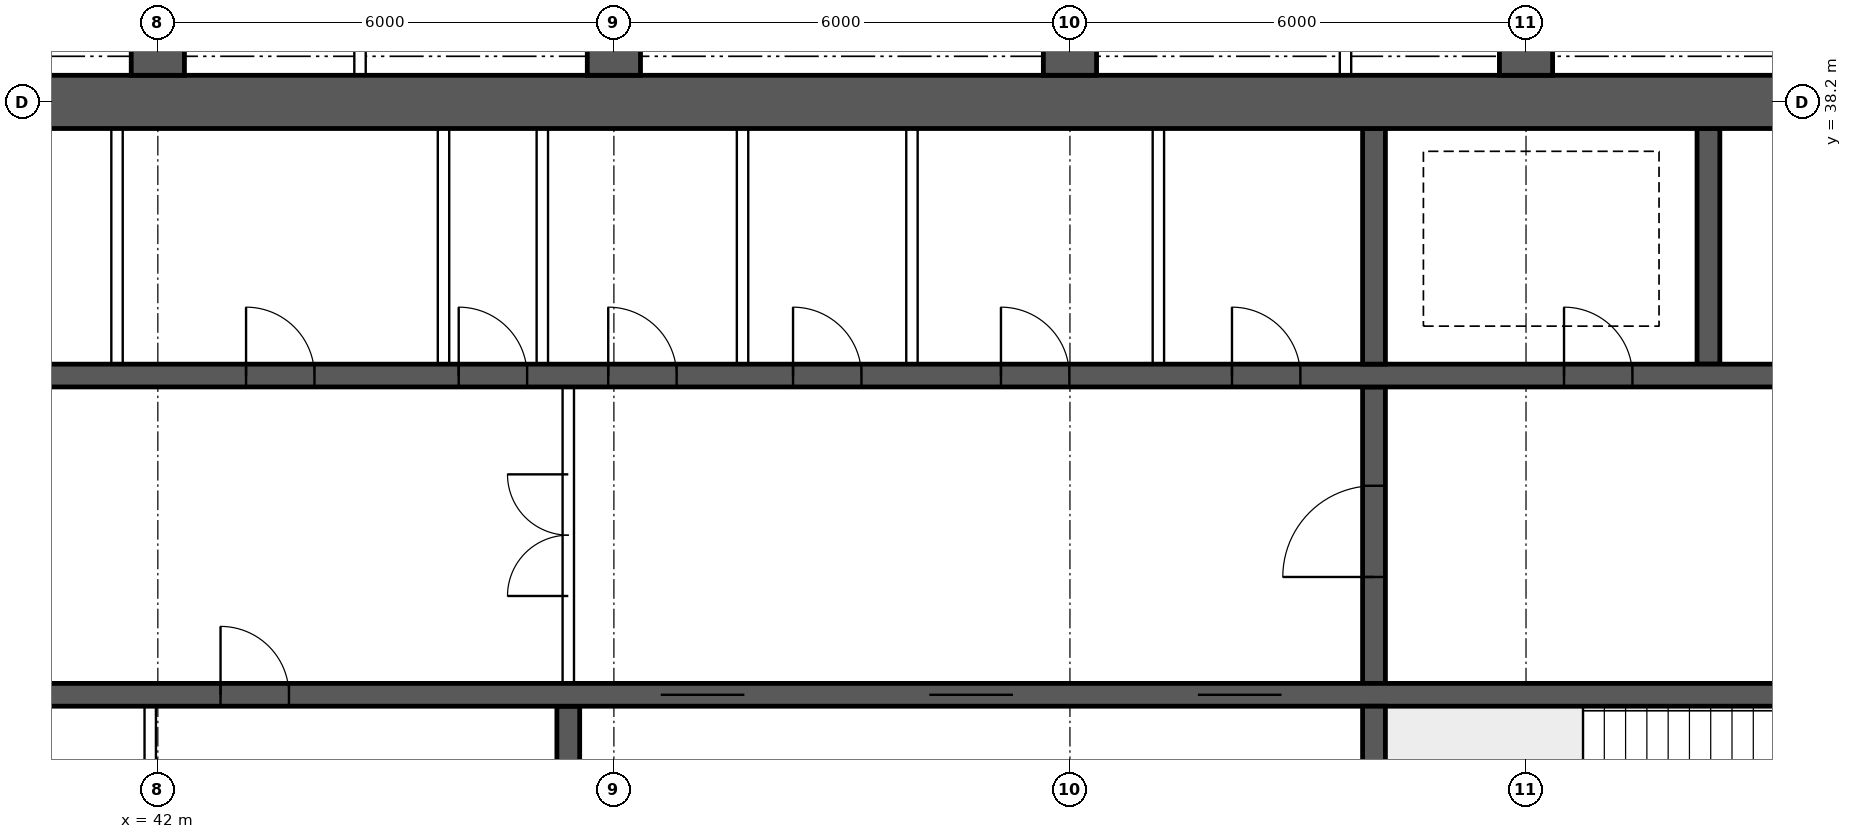
"""IFC4 building model, lengths in metres.
Left out: names, types, materials, properties, quantities, classifications, styles, units other than length and angle.
Written with IfcOpenShell. Run it as: python <this file> out.ifc"""

import sys

from ifc_helpers import new_model, si_unit, direction, frame, frame_2d, origin, place, context, subcontext, project, spatial, rectangle, extrude, element, fill, save


model = new_model("IFC4")
c1 = context("Model", 3, precision=1e-05, world=origin(), true_north=direction((0.0, 1.0)))
c2 = subcontext(c1, "Body", "Model", "MODEL_VIEW")
j1 = project(units=[si_unit("LENGTHUNIT", "METRE"), si_unit("PLANEANGLEUNIT", "RADIAN")], contexts=[c1])
p1 = place(None, origin())
s1 = spatial("IfcSite", under=j1, at=p1, CompositionType="ELEMENT")
p2 = place(p1, origin())
s2 = spatial("IfcBuilding", under=s1, at=p2, CompositionType="ELEMENT")
p3 = place(p2, frame((0.0, 0.0, 224.05)))
s3 = spatial("IfcBuildingStorey", under=s2, at=p3, CompositionType="ELEMENT", Elevation=224.05)
p4 = place(p3, frame((18.0, 38.2, 0.0), z_axis=(0.0, 0.0, 1.0), x_axis=(1.0, 0.0, 0.0)))
e1 = element("IfcWall", 1, at=p4, inside=s3, PredefinedType="SHEAR", context=c2, shape_type="SweptSolid", body=[
    extrude(rectangle(XDim=48.0, YDim=0.7, at=frame_2d((24.0, 0.0))), origin(), (0.0, 0.0, 1.0), 3.75),
])
p5 = place(p3, frame((18.35, 30.4, 0.0), z_axis=(0.0, 0.0, 1.0), x_axis=(1.0, 0.0, 0.0)))
e2 = element("IfcWall", 2, at=p5, inside=s3, PredefinedType="SHEAR", context=c2, shape_type="SweptSolid", body=[
    extrude(rectangle(XDim=47.3, YDim=0.3, at=frame_2d((23.65, 0.0))), origin(), (0.0, 0.0, 1.0), 3.75),
])
p6 = place(p5, frame((0.4, 0.0, 0.0)))
e3 = element("IfcOpeningElement", 3, at=p6, cuts=e2, PredefinedType="OPENING", context=c2, shape_type="SweptSolid", body=[
    extrude(rectangle(XDim=1.0, YDim=2.1, at=frame_2d((0.5, 1.05))), frame((0.0, 0.16, 0.0), z_axis=(0.0, -1.0, 0.0), x_axis=(1.0, 0.0, 0.0)), (0.0, 0.0, 1.0), 0.32),
])
p7 = place(p5, frame((45.9, 0.0, 0.0)))
e4 = element("IfcOpeningElement", 4, at=p7, cuts=e2, PredefinedType="OPENING", context=c2, shape_type="SweptSolid", body=[
    extrude(rectangle(XDim=1.0, YDim=2.1, at=frame_2d((0.5, 1.05))), frame((0.0, 0.16, 0.0), z_axis=(0.0, -1.0, 0.0), x_axis=(1.0, 0.0, 0.0)), (0.0, 0.0, 1.0), 0.32),
])
p8 = place(p5, frame((8.4, 0.0, 0.0)))
e5 = element("IfcOpeningElement", 5, at=p8, cuts=e2, PredefinedType="OPENING", context=c2, shape_type="SweptSolid", body=[
    extrude(rectangle(XDim=1.1, YDim=2.1, at=frame_2d((0.55, 1.05))), frame((0.0, 0.16, 0.0), z_axis=(0.0, -1.0, 0.0), x_axis=(1.0, 0.0, 0.0)), (0.0, 0.0, 1.0), 0.32),
])
p9 = place(p5, frame((11.0, 0.0, 0.0)))
e6 = element("IfcOpeningElement", 6, at=p9, cuts=e2, PredefinedType="OPENING", context=c2, shape_type="SweptSolid", body=[
    extrude(rectangle(XDim=1.1, YDim=2.1, at=frame_2d((0.55, 1.05))), frame((0.0, 0.16, 0.0), z_axis=(0.0, -1.0, 0.0), x_axis=(1.0, 0.0, 0.0)), (0.0, 0.0, 1.0), 0.32),
])
p10 = place(p5, frame((13.6, 0.0, 0.0)))
e7 = element("IfcOpeningElement", 7, at=p10, cuts=e2, PredefinedType="OPENING", context=c2, shape_type="SweptSolid", body=[
    extrude(rectangle(XDim=1.1, YDim=2.1, at=frame_2d((0.55, 1.05))), frame((0.0, 0.16, 0.0), z_axis=(0.0, -1.0, 0.0), x_axis=(1.0, 0.0, 0.0)), (0.0, 0.0, 1.0), 0.32),
])
p11 = place(p5, frame((16.2, 0.0, 0.0)))
e8 = element("IfcOpeningElement", 8, at=p11, cuts=e2, PredefinedType="OPENING", context=c2, shape_type="SweptSolid", body=[
    extrude(rectangle(XDim=1.1, YDim=2.1, at=frame_2d((0.55, 1.05))), frame((0.0, 0.16, 0.0), z_axis=(0.0, -1.0, 0.0), x_axis=(1.0, 0.0, 0.0)), (0.0, 0.0, 1.0), 0.32),
])
p12 = place(p5, frame((18.975, 0.0, 0.0)))
e9 = element("IfcOpeningElement", 9, at=p12, cuts=e2, PredefinedType="OPENING", context=c2, shape_type="SweptSolid", body=[
    extrude(rectangle(XDim=0.9, YDim=2.1, at=frame_2d((0.45, 1.05))), frame((0.0, 0.16, 0.0), z_axis=(0.0, -1.0, 0.0), x_axis=(1.0, 0.0, 0.0)), (0.0, 0.0, 1.0), 0.32),
])
p13 = place(p5, frame((24.475, 0.0, 0.0)))
e10 = element("IfcOpeningElement", 10, at=p13, cuts=e2, PredefinedType="OPENING", context=c2, shape_type="SweptSolid", body=[
    extrude(rectangle(XDim=0.9, YDim=2.1, at=frame_2d((0.45, 1.05))), frame((0.0, 0.16, 0.0), z_axis=(0.0, -1.0, 0.0), x_axis=(1.0, 0.0, 0.0)), (0.0, 0.0, 1.0), 0.32),
])
p14 = place(p5, frame((30.267, 0.0, 0.0)))
e11 = element("IfcOpeningElement", 11, at=p14, cuts=e2, PredefinedType="OPENING", context=c2, shape_type="SweptSolid", body=[
    extrude(rectangle(XDim=1.1, YDim=2.1, at=frame_2d((0.55, 1.05))), frame((0.0, 0.16, 0.0), z_axis=(0.0, -1.0, 0.0), x_axis=(1.0, 0.0, 0.0)), (0.0, 0.0, 1.0), 0.32),
])
p15 = place(p5, frame((33.8, 0.0, 0.0)))
e12 = element("IfcOpeningElement", 12, at=p15, cuts=e2, PredefinedType="OPENING", context=c2, shape_type="SweptSolid", body=[
    extrude(rectangle(XDim=1.1, YDim=2.1, at=frame_2d((0.55, 1.05))), frame((0.0, 0.16, 0.0), z_axis=(0.0, -1.0, 0.0), x_axis=(1.0, 0.0, 0.0)), (0.0, 0.0, 1.0), 0.32),
])
p16 = place(p5, frame((37.333, 0.0, 0.0)))
e13 = element("IfcOpeningElement", 13, at=p16, cuts=e2, PredefinedType="OPENING", context=c2, shape_type="SweptSolid", body=[
    extrude(rectangle(XDim=1.1, YDim=2.1, at=frame_2d((0.55, 1.05))), frame((0.0, 0.16, 0.0), z_axis=(0.0, -1.0, 0.0), x_axis=(1.0, 0.0, 0.0)), (0.0, 0.0, 1.0), 0.32),
])
p17 = place(p3, frame((18.35, 34.6, 0.0), z_axis=(0.0, 0.0, 1.0), x_axis=(1.0, 0.0, 0.0)))
e14 = element("IfcWall", 14, at=p17, inside=s3, PredefinedType="SHEAR", context=c2, shape_type="SweptSolid", body=[
    extrude(rectangle(XDim=47.3, YDim=0.3, at=frame_2d((23.65, 0.0))), origin(), (0.0, 0.0, 1.0), 3.75),
])
p18 = place(p17, frame((0.9, 0.0, 0.0)))
e15 = element("IfcOpeningElement", 15, at=p18, cuts=e14, PredefinedType="OPENING", context=c2, shape_type="SweptSolid", body=[
    extrude(rectangle(XDim=1.1, YDim=2.1, at=frame_2d((0.55, 1.05))), frame((0.0, 0.16, 0.0), z_axis=(0.0, -1.0, 0.0), x_axis=(1.0, 0.0, 0.0)), (0.0, 0.0, 1.0), 0.32),
])
p19 = place(p17, frame((45.3, 0.0, 0.0)))
e16 = element("IfcOpeningElement", 16, at=p19, cuts=e14, PredefinedType="OPENING", context=c2, shape_type="SweptSolid", body=[
    extrude(rectangle(XDim=1.1, YDim=2.1, at=frame_2d((0.55, 1.05))), frame((0.0, 0.16, 0.0), z_axis=(0.0, -1.0, 0.0), x_axis=(1.0, 0.0, 0.0)), (0.0, 0.0, 1.0), 0.32),
])
p20 = place(p17, frame((4.25, 0.0, 0.0)))
e17 = element("IfcOpeningElement", 17, at=p20, cuts=e14, PredefinedType="OPENING", context=c2, shape_type="SweptSolid", body=[
    extrude(rectangle(XDim=0.9, YDim=2.1, at=frame_2d((0.45, 1.05))), frame((0.0, 0.16, 0.0), z_axis=(0.0, -1.0, 0.0), x_axis=(1.0, 0.0, 0.0)), (0.0, 0.0, 1.0), 0.32),
])
p21 = place(p17, frame((42.15, 0.0, 0.0)))
e18 = element("IfcOpeningElement", 18, at=p21, cuts=e14, PredefinedType="OPENING", context=c2, shape_type="SweptSolid", body=[
    extrude(rectangle(XDim=0.9, YDim=2.1, at=frame_2d((0.45, 1.05))), frame((0.0, 0.16, 0.0), z_axis=(0.0, -1.0, 0.0), x_axis=(1.0, 0.0, 0.0)), (0.0, 0.0, 1.0), 0.32),
])
p22 = place(p17, frame((9.025, 0.0, 0.0)))
e19 = element("IfcOpeningElement", 19, at=p22, cuts=e14, PredefinedType="OPENING", context=c2, shape_type="SweptSolid", body=[
    extrude(rectangle(XDim=0.9, YDim=2.1, at=frame_2d((0.45, 1.05))), frame((0.0, 0.16, 0.0), z_axis=(0.0, -1.0, 0.0), x_axis=(1.0, 0.0, 0.0)), (0.0, 0.0, 1.0), 0.32),
])
p23 = place(p17, frame((12.999, 0.0, 0.0)))
e20 = element("IfcOpeningElement", 20, at=p23, cuts=e14, PredefinedType="OPENING", context=c2, shape_type="SweptSolid", body=[
    extrude(rectangle(XDim=0.9, YDim=2.1, at=frame_2d((0.45, 1.05))), frame((0.0, 0.16, 0.0), z_axis=(0.0, -1.0, 0.0), x_axis=(1.0, 0.0, 0.0)), (0.0, 0.0, 1.0), 0.32),
])
p24 = place(p17, frame((16.646, 0.0, 0.0)))
e21 = element("IfcOpeningElement", 21, at=p24, cuts=e14, PredefinedType="OPENING", context=c2, shape_type="SweptSolid", body=[
    extrude(rectangle(XDim=0.9, YDim=2.1, at=frame_2d((0.45, 1.05))), frame((0.0, 0.16, 0.0), z_axis=(0.0, -1.0, 0.0), x_axis=(1.0, 0.0, 0.0)), (0.0, 0.0, 1.0), 0.32),
])
p25 = place(p17, frame((20.405, 0.0, 0.0)))
e22 = element("IfcOpeningElement", 22, at=p25, cuts=e14, PredefinedType="OPENING", context=c2, shape_type="SweptSolid", body=[
    extrude(rectangle(XDim=0.9, YDim=2.1, at=frame_2d((0.45, 1.05))), frame((0.0, 0.16, 0.0), z_axis=(0.0, -1.0, 0.0), x_axis=(1.0, 0.0, 0.0)), (0.0, 0.0, 1.0), 0.32),
])
p26 = place(p17, frame((24.811, 0.0, 0.0)))
e23 = element("IfcOpeningElement", 23, at=p26, cuts=e14, PredefinedType="OPENING", context=c2, shape_type="SweptSolid", body=[
    extrude(rectangle(XDim=0.9, YDim=2.1, at=frame_2d((0.45, 1.05))), frame((0.0, 0.16, 0.0), z_axis=(0.0, -1.0, 0.0), x_axis=(1.0, 0.0, 0.0)), (0.0, 0.0, 1.0), 0.32),
])
p27 = place(p17, frame((27.608, 0.0, 0.0)))
e24 = element("IfcOpeningElement", 24, at=p27, cuts=e14, PredefinedType="OPENING", context=c2, shape_type="SweptSolid", body=[
    extrude(rectangle(XDim=0.9, YDim=2.1, at=frame_2d((0.45, 1.05))), frame((0.0, 0.16, 0.0), z_axis=(0.0, -1.0, 0.0), x_axis=(1.0, 0.0, 0.0)), (0.0, 0.0, 1.0), 0.32),
])
p28 = place(p17, frame((29.575, 0.0, 0.0)))
e25 = element("IfcOpeningElement", 25, at=p28, cuts=e14, PredefinedType="OPENING", context=c2, shape_type="SweptSolid", body=[
    extrude(rectangle(XDim=0.9, YDim=2.1, at=frame_2d((0.45, 1.05))), frame((0.0, 0.16, 0.0), z_axis=(0.0, -1.0, 0.0), x_axis=(1.0, 0.0, 0.0)), (0.0, 0.0, 1.0), 0.32),
])
p29 = place(p17, frame((32.007, 0.0, 0.0)))
e26 = element("IfcOpeningElement", 26, at=p29, cuts=e14, PredefinedType="OPENING", context=c2, shape_type="SweptSolid", body=[
    extrude(rectangle(XDim=0.9, YDim=2.1, at=frame_2d((0.45, 1.05))), frame((0.0, 0.16, 0.0), z_axis=(0.0, -1.0, 0.0), x_axis=(1.0, 0.0, 0.0)), (0.0, 0.0, 1.0), 0.32),
])
p30 = place(p17, frame((34.742, 0.0, 0.0)))
e27 = element("IfcOpeningElement", 27, at=p30, cuts=e14, PredefinedType="OPENING", context=c2, shape_type="SweptSolid", body=[
    extrude(rectangle(XDim=0.9, YDim=2.1, at=frame_2d((0.45, 1.05))), frame((0.0, 0.16, 0.0), z_axis=(0.0, -1.0, 0.0), x_axis=(1.0, 0.0, 0.0)), (0.0, 0.0, 1.0), 0.32),
])
p31 = place(p17, frame((37.781, 0.0, 0.0)))
e28 = element("IfcOpeningElement", 28, at=p31, cuts=e14, PredefinedType="OPENING", context=c2, shape_type="SweptSolid", body=[
    extrude(rectangle(XDim=0.9, YDim=2.1, at=frame_2d((0.45, 1.05))), frame((0.0, 0.16, 0.0), z_axis=(0.0, -1.0, 0.0), x_axis=(1.0, 0.0, 0.0)), (0.0, 0.0, 1.0), 0.32),
])
p32 = place(p3, frame((58.0, 26.15, 0.0), z_axis=(0.0, 0.0, 1.0), x_axis=(0.0, 1.0, 0.0)))
e29 = element("IfcWall", 29, at=p32, inside=s3, PredefinedType="SHEAR", context=c2, shape_type="SweptSolid", body=[
    extrude(rectangle(XDim=4.1, YDim=0.3, at=frame_2d((2.05, 0.0))), origin(), (0.0, 0.0, 1.0), 3.75),
])
p33 = place(p3, frame((58.0, 30.55, 0.0), z_axis=(0.0, 0.0, 1.0), x_axis=(0.0, 1.0, 0.0)))
e30 = element("IfcWall", 30, at=p33, inside=s3, PredefinedType="SHEAR", context=c2, shape_type="SweptSolid", body=[
    extrude(rectangle(XDim=3.9, YDim=0.3, at=frame_2d((1.95, 0.0))), origin(), (0.0, 0.0, 1.0), 3.75),
])
p34 = place(p33, frame((1.4, 0.0, 0.0)))
e31 = element("IfcOpeningElement", 31, at=p34, cuts=e30, PredefinedType="OPENING", context=c2, shape_type="SweptSolid", body=[
    extrude(rectangle(XDim=1.2, YDim=2.1, at=frame_2d((0.6, 1.05))), frame((0.0, 0.16, 0.0), z_axis=(0.0, -1.0, 0.0), x_axis=(1.0, 0.0, 0.0)), (0.0, 0.0, 1.0), 0.32),
])
for number, where, z_axis, x_axis in (
    (32, (62.4, 34.75, 0.0), (0.0, 0.0, 1.0), (0.0, 1.0, 0.0)),
    (33, (58.0, 34.75, 0.0), (0.0, 0.0, 1.0), (0.0, 1.0, 0.0)),
):
    element("IfcWall", number, at=place(p3, frame(where, z_axis=z_axis, x_axis=x_axis)), inside=s3, PredefinedType="SHEAR", context=c2, shape_type="SweptSolid", body=[
        extrude(rectangle(XDim=3.1, YDim=0.3, at=frame_2d((1.55, 0.0))), origin(), (0.0, 0.0, 1.0), 3.75),
    ])
p35 = place(p3, frame((47.4, 26.15, 0.0), z_axis=(0.0, 0.0, 1.0), x_axis=(0.0, 1.0, 0.0)))
e34 = element("IfcWall", 34, at=p35, inside=s3, PredefinedType="SHEAR", context=c2, shape_type="SweptSolid", body=[
    extrude(rectangle(XDim=4.1, YDim=0.3, at=frame_2d((2.05, 0.0))), origin(), (0.0, 0.0, 1.0), 3.75),
])
for number, where, z_axis, x_axis in (
    (35, (42.0, 38.55, 0.0), (0.0, 0.0, 1.0), (0.0, 1.0, 0.0)),
    (36, (48.0, 38.55, 0.0), (0.0, 0.0, 1.0), (0.0, 1.0, 0.0)),
    (37, (54.0, 38.55, 0.0), (0.0, 0.0, 1.0), (0.0, 1.0, 0.0)),
    (38, (60.0, 38.55, 0.0), (0.0, 0.0, 1.0), (0.0, 1.0, 0.0)),
):
    element("IfcWall", number, at=place(p3, frame(where, z_axis=z_axis, x_axis=x_axis)), inside=s3, PredefinedType="SHEAR", context=c2, shape_type="SweptSolid", body=[
        extrude(rectangle(XDim=7.05, YDim=0.7, at=frame_2d((3.525, 0.0))), origin(), (0.0, 0.0, 1.0), 3.75),
    ])
p36 = place(p3, frame((47.4, 30.55, 0.0), z_axis=(0.0, 0.0, 1.0), x_axis=(0.0, 1.0, 0.0)))
e39 = element("IfcWall", 39, at=p36, inside=s3, PredefinedType="SOLIDWALL", context=c2, shape_type="SweptSolid", body=[
    extrude(rectangle(XDim=3.9, YDim=0.15, at=frame_2d((1.95, 0.0))), origin(), (0.0, 0.0, 1.0), 3.5),
])
p37 = place(p36, frame((1.15, 0.0, 0.0)))
e40 = element("IfcOpeningElement", 40, at=p37, cuts=e39, PredefinedType="OPENING", context=c2, shape_type="SweptSolid", body=[
    extrude(rectangle(XDim=1.6, YDim=2.1, at=frame_2d((0.8, 1.05))), frame((0.0, 0.085, 0.0), z_axis=(0.0, -1.0, 0.0), x_axis=(1.0, 0.0, 0.0)), (0.0, 0.0, 1.0), 0.17),
])
for number, where, z_axis, x_axis in (
    (41, (41.463, 34.75, 0.0), (0.0, 0.0, 1.0), (0.0, 1.0, 0.0)),
    (42, (45.758, 34.75, 0.0), (0.0, 0.0, 1.0), (0.0, 1.0, 0.0)),
    (43, (47.058, 34.75, 0.0), (0.0, 0.0, 1.0), (0.0, 1.0, 0.0)),
    (44, (49.692, 34.75, 0.0), (0.0, 0.0, 1.0), (0.0, 1.0, 0.0)),
    (45, (51.921, 34.75, 0.0), (0.0, 0.0, 1.0), (0.0, 1.0, 0.0)),
    (46, (55.163, 34.75, 0.0), (0.0, 0.0, 1.0), (0.0, 1.0, 0.0)),
):
    element("IfcWall", number, at=place(p3, frame(where, z_axis=z_axis, x_axis=x_axis)), inside=s3, PredefinedType="SOLIDWALL", context=c2, shape_type="SweptSolid", body=[
        extrude(rectangle(XDim=3.1, YDim=0.15, at=frame_2d((1.55, 0.0))), origin(), (0.0, 0.0, 1.0), 3.5),
    ])
p38 = place(p3, frame((41.9, 26.15, 0.0), z_axis=(0.0, 0.0, 1.0), x_axis=(0.0, 1.0, 0.0)))
e47 = element("IfcWall", 47, at=p38, inside=s3, PredefinedType="SOLIDWALL", context=c2, shape_type="SweptSolid", body=[
    extrude(rectangle(XDim=4.1, YDim=0.15, at=frame_2d((2.05, 0.0))), origin(), (0.0, 0.0, 1.0), 3.5),
])
for number, where, z_axis, x_axis in (
    (48, (44.66, 38.55, 0.0), (0.0, 0.0, 1.0), (0.0, 1.0, 0.0)),
    (49, (57.625, 38.55, 0.0), (0.0, 0.0, 1.0), (0.0, 1.0, 0.0)),
):
    element("IfcWall", number, at=place(p3, frame(where, z_axis=z_axis, x_axis=x_axis)), inside=s3, PredefinedType="PARTITIONING", context=c2, shape_type="SweptSolid", body=[
        extrude(rectangle(XDim=6.95, YDim=0.15, at=frame_2d((3.475, 0.0))), origin(), (0.0, 0.0, 1.0), 3.5),
    ])
p39 = place(p37, origin())
e50 = element("IfcDoor", 50, at=p39, inside=s3, OperationType="DOUBLE_DOOR_SINGLE_SWING", PredefinedType="DOOR", context=c2, shape_type="SweptSolid", body=[
    extrude(rectangle(XDim=1.6, YDim=2.1, at=frame_2d((0.8, 1.05))), frame((0.0, 0.025, 0.0), z_axis=(0.0, -1.0, 0.0), x_axis=(1.0, 0.0, 0.0)), (0.0, 0.0, 1.0), 0.05),
])
fill(e40, e50)
p40 = place(p21, origin())
e51 = element("IfcDoor", 51, at=p40, inside=s3, OperationType="SINGLE_SWING_LEFT", PredefinedType="DOOR", context=c2, shape_type="SweptSolid", body=[
    extrude(rectangle(XDim=0.9, YDim=2.1, at=frame_2d((0.45, 1.05))), frame((0.0, 0.025, 0.0), z_axis=(0.0, -1.0, 0.0), x_axis=(1.0, 0.0, 0.0)), (0.0, 0.0, 1.0), 0.05),
])
fill(e18, e51)
p41 = place(p34, origin())
e52 = element("IfcDoor", 52, at=p41, inside=s3, OperationType="SINGLE_SWING_LEFT", PredefinedType="DOOR", context=c2, shape_type="SweptSolid", body=[
    extrude(rectangle(XDim=1.2, YDim=2.1, at=frame_2d((0.6, 1.05))), frame((0.0, 0.025, 0.0), z_axis=(0.0, -1.0, 0.0), x_axis=(1.0, 0.0, 0.0)), (0.0, 0.0, 1.0), 0.05),
])
fill(e31, e52)
p42 = place(p26, origin())
e53 = element("IfcDoor", 53, at=p42, inside=s3, OperationType="SINGLE_SWING_LEFT", PredefinedType="DOOR", context=c2, shape_type="SweptSolid", body=[
    extrude(rectangle(XDim=0.9, YDim=2.1, at=frame_2d((0.45, 1.05))), frame((0.0, 0.025, 0.0), z_axis=(0.0, -1.0, 0.0), x_axis=(1.0, 0.0, 0.0)), (0.0, 0.0, 1.0), 0.05),
])
fill(e23, e53)
p43 = place(p27, origin())
e54 = element("IfcDoor", 54, at=p43, inside=s3, OperationType="SINGLE_SWING_LEFT", PredefinedType="DOOR", context=c2, shape_type="SweptSolid", body=[
    extrude(rectangle(XDim=0.9, YDim=2.1, at=frame_2d((0.45, 1.05))), frame((0.0, 0.025, 0.0), z_axis=(0.0, -1.0, 0.0), x_axis=(1.0, 0.0, 0.0)), (0.0, 0.0, 1.0), 0.05),
])
fill(e24, e54)
p44 = place(p28, origin())
e55 = element("IfcDoor", 55, at=p44, inside=s3, OperationType="SINGLE_SWING_LEFT", PredefinedType="DOOR", context=c2, shape_type="SweptSolid", body=[
    extrude(rectangle(XDim=0.9, YDim=2.1, at=frame_2d((0.45, 1.05))), frame((0.0, 0.025, 0.0), z_axis=(0.0, -1.0, 0.0), x_axis=(1.0, 0.0, 0.0)), (0.0, 0.0, 1.0), 0.05),
])
fill(e25, e55)
p45 = place(p29, origin())
e56 = element("IfcDoor", 56, at=p45, inside=s3, OperationType="SINGLE_SWING_LEFT", PredefinedType="DOOR", context=c2, shape_type="SweptSolid", body=[
    extrude(rectangle(XDim=0.9, YDim=2.1, at=frame_2d((0.45, 1.05))), frame((0.0, 0.025, 0.0), z_axis=(0.0, -1.0, 0.0), x_axis=(1.0, 0.0, 0.0)), (0.0, 0.0, 1.0), 0.05),
])
fill(e26, e56)
p46 = place(p30, origin())
e57 = element("IfcDoor", 57, at=p46, inside=s3, OperationType="SINGLE_SWING_LEFT", PredefinedType="DOOR", context=c2, shape_type="SweptSolid", body=[
    extrude(rectangle(XDim=0.9, YDim=2.1, at=frame_2d((0.45, 1.05))), frame((0.0, 0.025, 0.0), z_axis=(0.0, -1.0, 0.0), x_axis=(1.0, 0.0, 0.0)), (0.0, 0.0, 1.0), 0.05),
])
fill(e27, e57)
p47 = place(p31, origin())
e58 = element("IfcDoor", 58, at=p47, inside=s3, OperationType="SINGLE_SWING_LEFT", PredefinedType="DOOR", context=c2, shape_type="SweptSolid", body=[
    extrude(rectangle(XDim=0.9, YDim=2.1, at=frame_2d((0.45, 1.05))), frame((0.0, 0.025, 0.0), z_axis=(0.0, -1.0, 0.0), x_axis=(1.0, 0.0, 0.0)), (0.0, 0.0, 1.0), 0.05),
])
fill(e28, e58)
p48 = place(p13, origin())
e59 = element("IfcDoor", 59, at=p48, inside=s3, OperationType="SINGLE_SWING_LEFT", PredefinedType="DOOR", context=c2, shape_type="SweptSolid", body=[
    extrude(rectangle(XDim=0.9, YDim=2.1, at=frame_2d((0.45, 1.05))), frame((0.0, 0.025, 0.0), z_axis=(0.0, -1.0, 0.0), x_axis=(1.0, 0.0, 0.0)), (0.0, 0.0, 1.0), 0.05),
])
fill(e10, e59)
p49 = place(p14, origin())
e60 = element("IfcDoor", 60, at=p49, inside=s3, OperationType="DOUBLE_DOOR_SLIDING", PredefinedType="DOOR", context=c2, shape_type="SweptSolid", body=[
    extrude(rectangle(XDim=1.1, YDim=2.1, at=frame_2d((0.55, 1.05))), frame((0.0, 0.025, 0.0), z_axis=(0.0, -1.0, 0.0), x_axis=(1.0, 0.0, 0.0)), (0.0, 0.0, 1.0), 0.05),
])
fill(e11, e60)
p50 = place(p15, origin())
e61 = element("IfcDoor", 61, at=p50, inside=s3, OperationType="DOUBLE_DOOR_SLIDING", PredefinedType="DOOR", context=c2, shape_type="SweptSolid", body=[
    extrude(rectangle(XDim=1.1, YDim=2.1, at=frame_2d((0.55, 1.05))), frame((0.0, 0.025, 0.0), z_axis=(0.0, -1.0, 0.0), x_axis=(1.0, 0.0, 0.0)), (0.0, 0.0, 1.0), 0.05),
])
fill(e12, e61)
p51 = place(p16, origin())
e62 = element("IfcDoor", 62, at=p51, inside=s3, OperationType="DOUBLE_DOOR_SLIDING", PredefinedType="DOOR", context=c2, shape_type="SweptSolid", body=[
    extrude(rectangle(XDim=1.1, YDim=2.1, at=frame_2d((0.55, 1.05))), frame((0.0, 0.025, 0.0), z_axis=(0.0, -1.0, 0.0), x_axis=(1.0, 0.0, 0.0)), (0.0, 0.0, 1.0), 0.05),
])
fill(e13, e62)
save(model, sys.argv[1])
